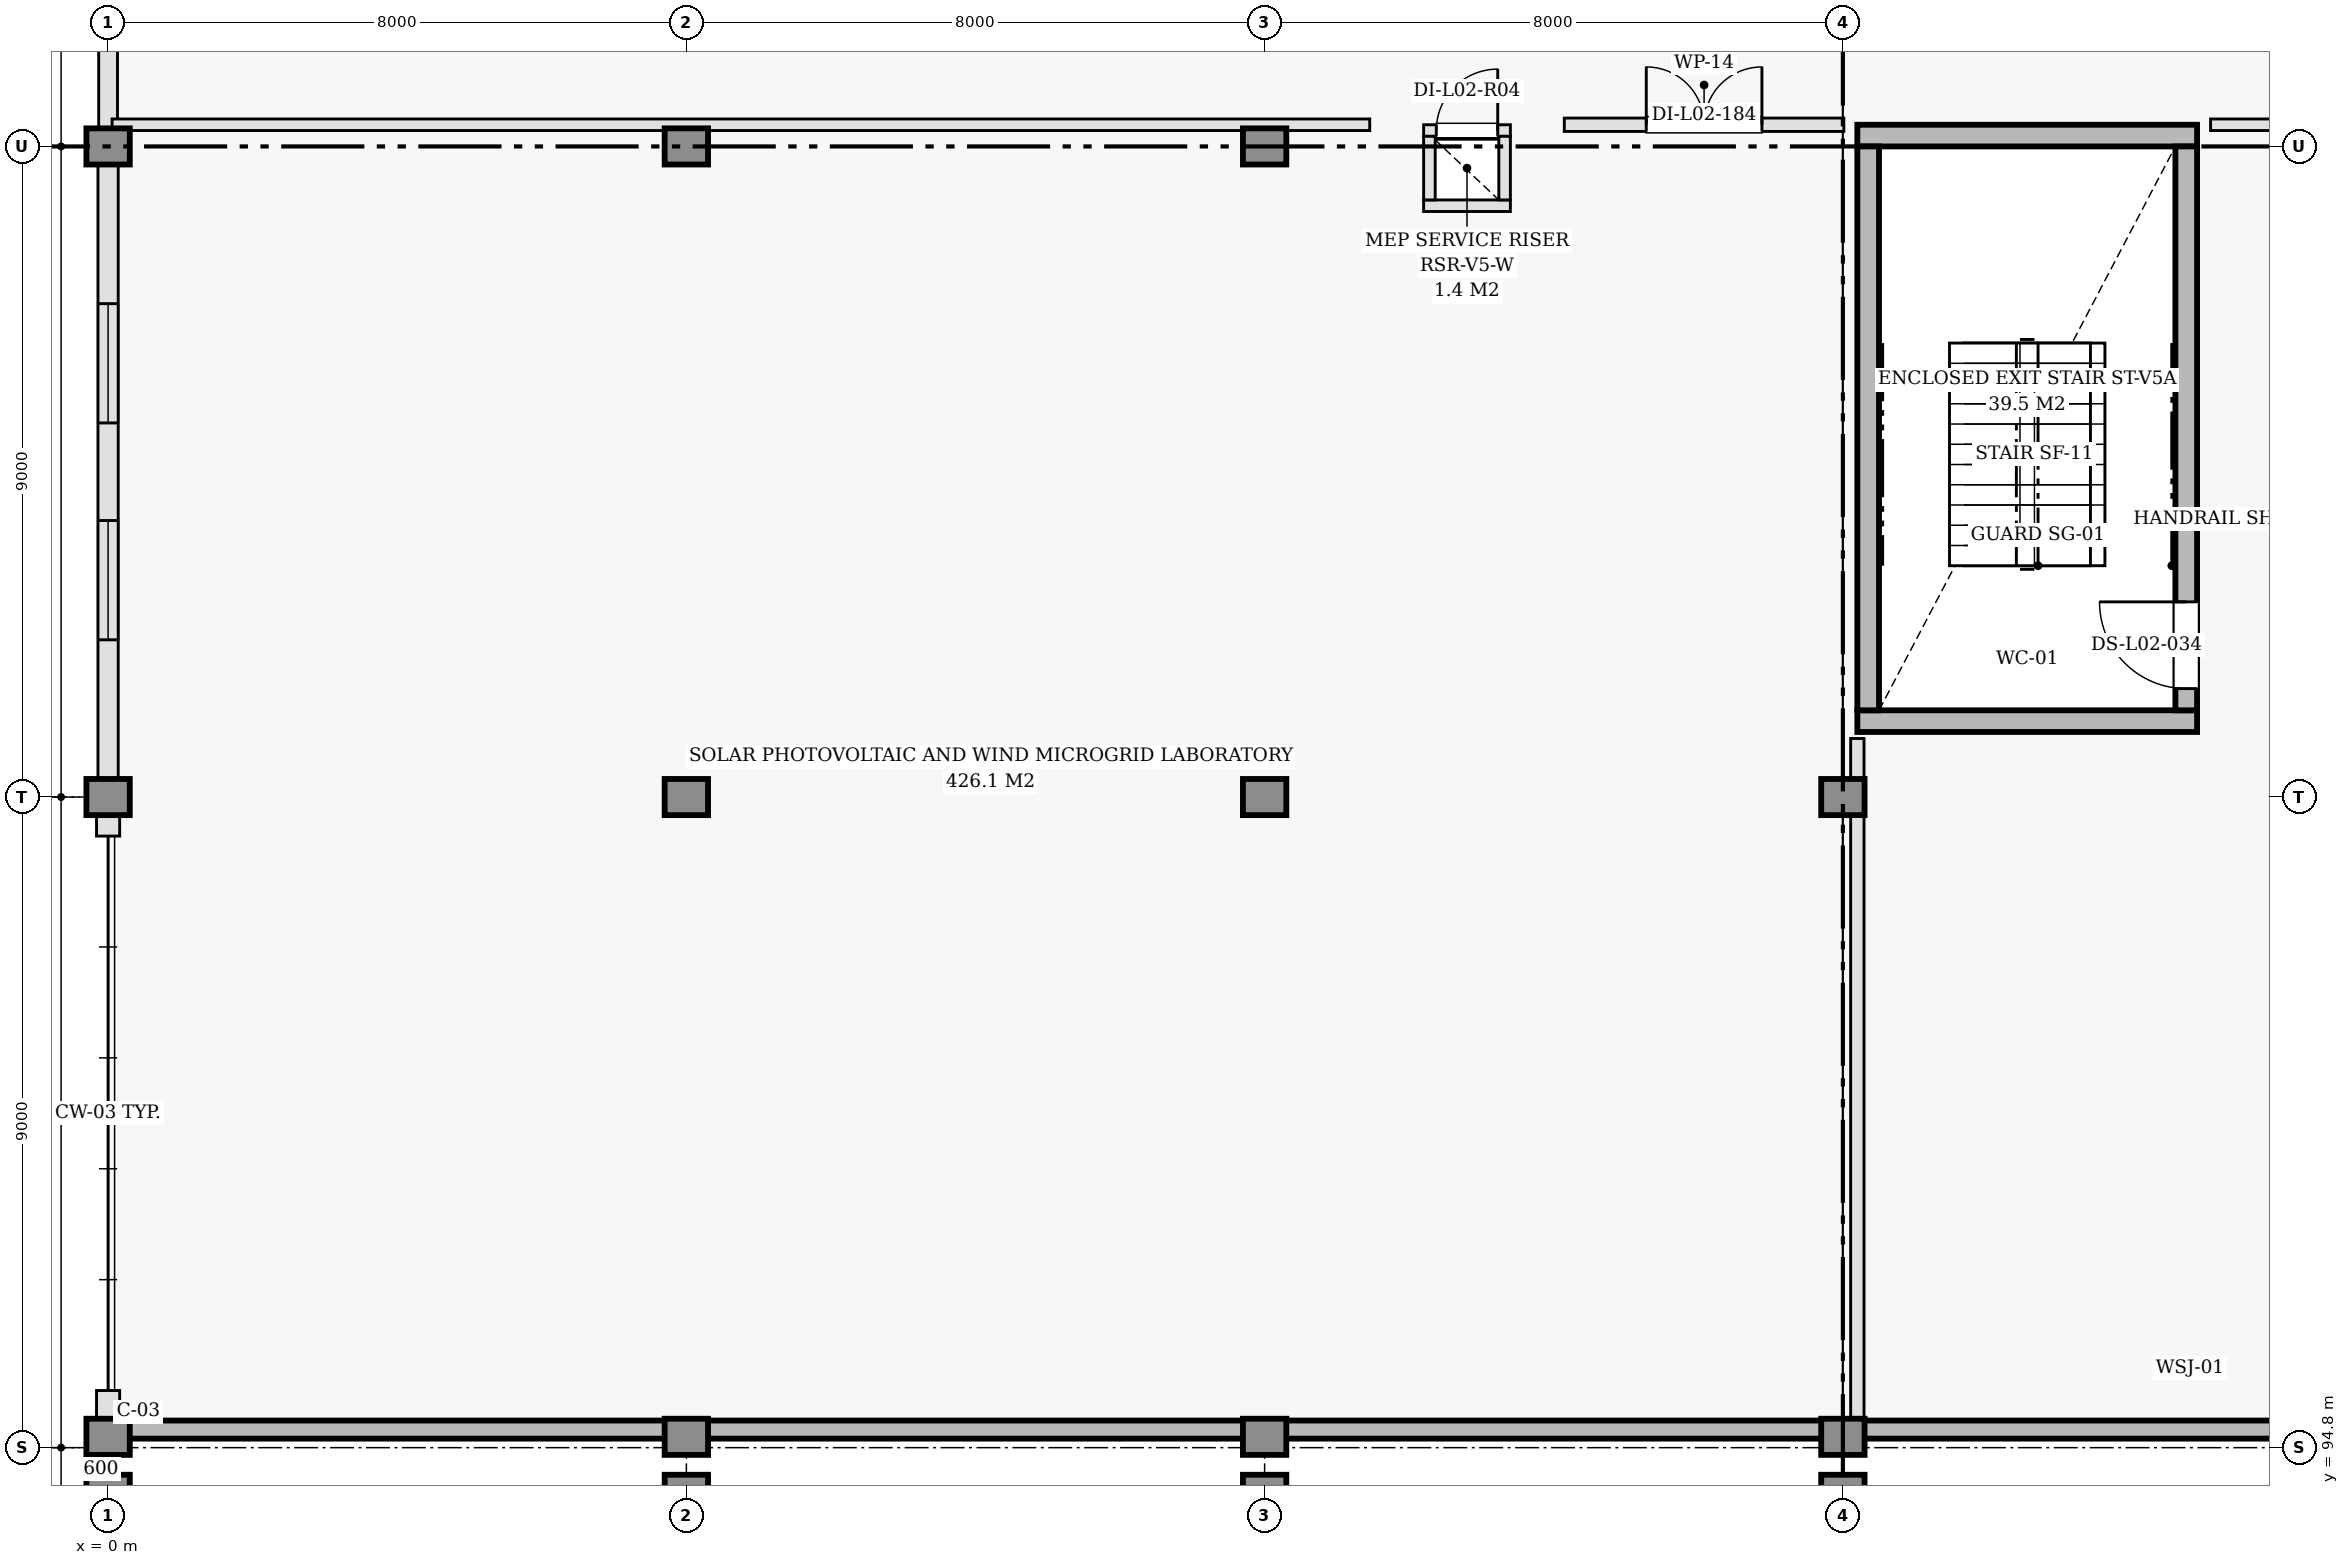
"""IFC4 building model, lengths in metres.
Left out: names, types, materials, properties, quantities, classifications, styles, units other than length and angle.
Written with IfcOpenShell. Run it as: python <this file> out.ifc"""

import sys

from ifc_helpers import new_model, si_unit, direction, frame, frame_2d, origin, origin_2d, place, context, subcontext, project, spatial, rectangle, extrude, element, fill, save


model = new_model("IFC4")
c1 = context("Model", 3, precision=1e-05, world=origin(), true_north=direction((0.0, 1.0)))
c2 = subcontext(c1, "Body", "Model", "MODEL_VIEW")
j1 = project(units=[si_unit("LENGTHUNIT", "METRE"), si_unit("PLANEANGLEUNIT", "RADIAN")], contexts=[c1])
p1 = place(None, origin())
s1 = spatial("IfcSite", under=j1, at=p1, CompositionType="ELEMENT")
p2 = place(p1, origin())
s2 = spatial("IfcBuilding", under=s1, at=p2, CompositionType="ELEMENT")
p3 = place(p2, frame((0.0, 0.0, 9.6)))
s3 = spatial("IfcBuildingStorey", under=s2, at=p3, CompositionType="ELEMENT", Elevation=9.6)
for number, where, z_axis, x_axis in (
    (1, (0.0, 94.95, 0.0), (0.0, 0.0, 1.0), (1.0, 0.0, 0.0)),
    (2, (0.0, 103.8, 0.0), (0.0, 0.0, 1.0), (1.0, 0.0, 0.0)),
    (3, (0.0, 112.8, 0.0), (0.0, 0.0, 1.0), (1.0, 0.0, 0.0)),
    (4, (8.0, 94.95, 0.0), (0.0, 0.0, 1.0), (1.0, 0.0, 0.0)),
    (5, (8.0, 103.8, 0.0), (0.0, 0.0, 1.0), (1.0, 0.0, 0.0)),
    (6, (8.0, 112.8, 0.0), (0.0, 0.0, 1.0), (1.0, 0.0, 0.0)),
    (7, (16.0, 94.95, 0.0), (0.0, 0.0, 1.0), (1.0, 0.0, 0.0)),
    (8, (16.0, 103.8, 0.0), (0.0, 0.0, 1.0), (1.0, 0.0, 0.0)),
    (9, (16.0, 112.8, 0.0), (0.0, 0.0, 1.0), (1.0, 0.0, 0.0)),
    (10, (24.0, 94.95, 0.0), (0.0, 0.0, 1.0), (1.0, 0.0, 0.0)),
    (11, (24.0, 103.8, 0.0), (0.0, 0.0, 1.0), (1.0, 0.0, 0.0)),
):
    element("IfcColumn", number, at=place(p3, frame(where, z_axis=z_axis, x_axis=x_axis)), inside=s3, PredefinedType="COLUMN", context=c2, shape_type="SweptSolid", body=[
        extrude(rectangle(XDim=0.5, YDim=0.5, at=origin_2d()), origin(), (0.0, 0.0, 1.0), 4.2),
    ])
for number, where, z_axis, x_axis in (
    (12, (0.0, 94.2, 0.0), (0.0, 0.0, 1.0), (1.0, 0.0, 0.0)),
    (13, (8.0, 94.2, 0.0), (0.0, 0.0, 1.0), (1.0, 0.0, 0.0)),
    (14, (16.0, 94.2, 0.0), (0.0, 0.0, 1.0), (1.0, 0.0, 0.0)),
    (15, (24.0, 94.2, 0.0), (0.0, 0.0, 1.0), (1.0, 0.0, 0.0)),
):
    element("IfcColumn", number, at=place(p3, frame(where, z_axis=z_axis, x_axis=x_axis)), inside=s3, PredefinedType="COLUMN", context=c2, shape_type="SweptSolid", body=[
        extrude(rectangle(XDim=0.45, YDim=0.45, at=origin_2d()), origin(), (0.0, 0.0, 1.0), 4.2),
    ])
p4 = place(p3, frame((0.0, 95.05, 0.0), z_axis=(0.0, 0.0, 1.0), x_axis=(1.0, 0.0, 0.0)))
e16 = element("IfcWall", 16, at=p4, inside=s3, PredefinedType="SHEAR", context=c2, shape_type="SweptSolid", body=[
    extrude(rectangle(XDim=57.6, YDim=0.25, at=frame_2d((28.8, 0.0))), origin(), (0.0, 0.0, 1.0), 3.94),
])
p5 = place(p3, frame((0.0, 121.8, 0.0), z_axis=(0.0, 0.0, 1.0), x_axis=(0.0, -1.0, 0.0)))
e17 = element("IfcWall", 17, at=p5, inside=s3, PredefinedType="SOLIDWALL", context=c2, shape_type="SweptSolid", body=[
    extrude(rectangle(XDim=9.0, YDim=0.26, at=frame_2d((4.5, 0.0))), origin(), (0.0, 0.0, 1.0), 3.175),
])
p6 = place(p5, frame((2.1, 0.0, 0.95)))
e18 = element("IfcOpeningElement", 18, at=p6, cuts=e17, PredefinedType="OPENING", context=c2, shape_type="SweptSolid", body=[
    extrude(rectangle(XDim=1.8, YDim=1.75, at=frame_2d((0.9, 0.875))), frame((0.0, 0.14, 0.0), z_axis=(0.0, -1.0, 0.0), x_axis=(1.0, 0.0, 0.0)), (0.0, 0.0, 1.0), 0.28),
])
p7 = place(p3, frame((0.0, 112.8, 0.0), z_axis=(0.0, 0.0, 1.0), x_axis=(0.0, -1.0, 0.0)))
e19 = element("IfcWall", 19, at=p7, inside=s3, PredefinedType="SOLIDWALL", context=c2, shape_type="SweptSolid", body=[
    extrude(rectangle(XDim=9.0, YDim=0.28, at=frame_2d((4.5, 0.0))), origin(), (0.0, 0.0, 1.0), 3.175),
])
p8 = place(p7, frame((2.175, 0.0, 0.95)))
e20 = element("IfcOpeningElement", 20, at=p8, cuts=e19, PredefinedType="OPENING", context=c2, shape_type="SweptSolid", body=[
    extrude(rectangle(XDim=1.65, YDim=1.7, at=frame_2d((0.825, 0.85))), frame((0.0, 0.15, 0.0), z_axis=(0.0, -1.0, 0.0), x_axis=(1.0, 0.0, 0.0)), (0.0, 0.0, 1.0), 0.3),
])
p9 = place(p7, frame((5.175, 0.0, 0.95)))
e21 = element("IfcOpeningElement", 21, at=p9, cuts=e19, PredefinedType="OPENING", context=c2, shape_type="SweptSolid", body=[
    extrude(rectangle(XDim=1.65, YDim=1.7, at=frame_2d((0.825, 0.85))), frame((0.0, 0.15, 0.0), z_axis=(0.0, -1.0, 0.0), x_axis=(1.0, 0.0, 0.0)), (0.0, 0.0, 1.0), 0.3),
])
p10 = place(p3, frame((0.0, 103.8, 0.0), z_axis=(0.0, 0.0, 1.0), x_axis=(0.0, -1.0, 0.0)))
e22 = element("IfcWall", 22, at=p10, inside=s3, PredefinedType="SOLIDWALL", context=c2, shape_type="SweptSolid", body=[
    extrude(rectangle(XDim=0.54, YDim=0.32, at=frame_2d((0.27, 0.0))), origin(), (0.0, 0.0, 1.0), 3.175),
])
p11 = place(p3, frame((0.0, 95.59, 0.0), z_axis=(0.0, 0.0, 1.0), x_axis=(0.0, -1.0, 0.0)))
e23 = element("IfcWall", 23, at=p11, inside=s3, PredefinedType="SOLIDWALL", context=c2, shape_type="SweptSolid", body=[
    extrude(rectangle(XDim=0.413, YDim=0.32, at=frame_2d((0.207, 0.0))), origin(), (0.0, 0.0, 1.0), 3.175),
])
for number, where, z_axis, x_axis in (
    (24, (24.2, 104.85, 0.0), (0.0, 0.0, 1.0), (1.0, 0.0, 0.0)),
    (25, (24.2, 112.95, 0.0), (0.0, 0.0, 1.0), (1.0, 0.0, 0.0)),
):
    element("IfcWall", number, at=place(p3, frame(where, z_axis=z_axis, x_axis=x_axis)), inside=s3, PredefinedType="SHEAR", context=c2, shape_type="SweptSolid", body=[
        extrude(rectangle(XDim=4.7, YDim=0.3, at=frame_2d((2.35, 0.0))), origin(), (0.0, 0.0, 1.0), 3.94),
    ])
p12 = place(p3, frame((24.35, 105.0, 0.0), z_axis=(0.0, 0.0, 1.0), x_axis=(0.0, 1.0, 0.0)))
e26 = element("IfcWall", 26, at=p12, inside=s3, PredefinedType="SHEAR", context=c2, shape_type="SweptSolid", body=[
    extrude(rectangle(XDim=7.8, YDim=0.3, at=frame_2d((3.9, 0.0))), origin(), (0.0, 0.0, 1.0), 3.94),
])
p13 = place(p3, frame((28.75, 105.0, 0.0), z_axis=(0.0, 0.0, 1.0), x_axis=(0.0, 1.0, 0.0)))
e27 = element("IfcWall", 27, at=p13, inside=s3, PredefinedType="SHEAR", context=c2, shape_type="SweptSolid", body=[
    extrude(rectangle(XDim=7.8, YDim=0.3, at=frame_2d((3.9, 0.0))), origin(), (0.0, 0.0, 1.0), 3.94),
])
p14 = place(p13, frame((0.3, 0.0, 0.0)))
e28 = element("IfcOpeningElement", 28, at=p14, cuts=e27, PredefinedType="OPENING", context=c2, shape_type="SweptSolid", body=[
    extrude(rectangle(XDim=1.2, YDim=2.15, at=frame_2d((0.6, 1.075))), frame((0.0, 0.16, 0.0), z_axis=(0.0, -1.0, 0.0), x_axis=(1.0, 0.0, 0.0)), (0.0, 0.0, 1.0), 0.32),
])
p15 = place(p3, frame((18.2, 111.98, 0.0), z_axis=(0.0, 0.0, 1.0), x_axis=(1.0, 0.0, 0.0)))
e29 = element("IfcWall", 29, at=p15, inside=s3, PredefinedType="PARTITIONING", context=c2, shape_type="SweptSolid", body=[
    extrude(rectangle(XDim=1.2, YDim=0.16, at=frame_2d((0.6, 0.0))), origin(), (0.0, 0.0, 1.0), 3.94),
])
p16 = place(p3, frame((18.2, 113.02, 0.0), z_axis=(0.0, 0.0, 1.0), x_axis=(1.0, 0.0, 0.0)))
e30 = element("IfcWall", 30, at=p16, inside=s3, PredefinedType="PARTITIONING", context=c2, shape_type="SweptSolid", body=[
    extrude(rectangle(XDim=1.2, YDim=0.16, at=frame_2d((0.6, 0.0))), origin(), (0.0, 0.0, 1.0), 3.94),
])
p17 = place(p16, frame((0.175, 0.0, 0.0)))
e31 = element("IfcOpeningElement", 31, at=p17, cuts=e30, PredefinedType="OPENING", context=c2, shape_type="SweptSolid", body=[
    extrude(rectangle(XDim=0.85, YDim=2.02, at=frame_2d((0.425, 1.01))), frame((0.0, 0.09, 0.0), z_axis=(0.0, -1.0, 0.0), x_axis=(1.0, 0.0, 0.0)), (0.0, 0.0, 1.0), 0.18),
])
for number, where, z_axis, x_axis in (
    (32, (18.28, 112.06, 0.0), (0.0, 0.0, 1.0), (0.0, 1.0, 0.0)),
    (33, (19.32, 112.06, 0.0), (0.0, 0.0, 1.0), (0.0, 1.0, 0.0)),
):
    element("IfcWall", number, at=place(p3, frame(where, z_axis=z_axis, x_axis=x_axis)), inside=s3, PredefinedType="PARTITIONING", context=c2, shape_type="SweptSolid", body=[
        extrude(rectangle(XDim=0.88, YDim=0.16, at=frame_2d((0.44, 0.0))), origin(), (0.0, 0.0, 1.0), 3.94),
    ])
p18 = place(p3, frame((20.146, 113.1, 0.0), z_axis=(0.0, 0.0, 1.0), x_axis=(1.0, 0.0, 0.0)))
e34 = element("IfcWall", 34, at=p18, inside=s3, PredefinedType="PARTITIONING", context=c2, shape_type="SweptSolid", body=[
    extrude(rectangle(XDim=3.867, YDim=0.185, at=frame_2d((1.934, 0.0))), origin(), (0.0, 0.0, 1.0), 3.94),
])
p19 = place(p18, frame((1.134, 0.0, 0.0)))
e35 = element("IfcOpeningElement", 35, at=p19, cuts=e34, PredefinedType="OPENING", context=c2, shape_type="SweptSolid", body=[
    extrude(rectangle(XDim=1.6, YDim=2.2, at=frame_2d((0.8, 1.1))), frame((0.0, 0.103, 0.0), z_axis=(0.0, -1.0, 0.0), x_axis=(1.0, 0.0, 0.0)), (0.0, 0.0, 1.0), 0.205),
])
p20 = place(p3, frame((0.055, 113.1, 0.0), z_axis=(0.0, 0.0, 1.0), x_axis=(1.0, 0.0, 0.0)))
e36 = element("IfcWall", 36, at=p20, inside=s3, PredefinedType="PARTITIONING", context=c2, shape_type="SweptSolid", body=[
    extrude(rectangle(XDim=17.399, YDim=0.16, at=frame_2d((8.7, 0.0))), origin(), (0.0, 0.0, 1.0), 3.175),
])
p21 = place(p3, frame((24.2, 95.105, 0.0), z_axis=(0.0, 0.0, 1.0), x_axis=(0.0, 1.0, 0.0)))
e37 = element("IfcWall", 37, at=p21, inside=s3, PredefinedType="PARTITIONING", context=c2, shape_type="SweptSolid", body=[
    extrude(rectangle(XDim=9.505, YDim=0.185, at=frame_2d((4.752, 0.0))), origin(), (0.0, 0.0, 1.0), 3.175),
])
p22 = place(p3, frame((29.087, 113.1, 0.0), z_axis=(0.0, 0.0, 1.0), x_axis=(1.0, 0.0, 0.0)))
e38 = element("IfcWall", 38, at=p22, inside=s3, PredefinedType="PARTITIONING", context=c2, shape_type="SweptSolid", body=[
    extrude(rectangle(XDim=2.873, YDim=0.16, at=frame_2d((1.437, 0.0))), origin(), (0.0, 0.0, 1.0), 3.275),
])
p23 = place(p8, origin())
e39 = element("IfcWindow", 39, at=p23, inside=s3, PartitioningType="DOUBLE_PANEL_VERTICAL", PredefinedType="WINDOW", context=c2, shape_type="SweptSolid", body=[
    extrude(rectangle(XDim=1.65, YDim=1.7, at=frame_2d((0.825, 0.85))), frame((0.0, 0.03, 0.0), z_axis=(0.0, -1.0, 0.0), x_axis=(1.0, 0.0, 0.0)), (0.0, 0.0, 1.0), 0.06),
])
fill(e20, e39)
p24 = place(p9, origin())
e40 = element("IfcWindow", 40, at=p24, inside=s3, PartitioningType="DOUBLE_PANEL_VERTICAL", PredefinedType="WINDOW", context=c2, shape_type="SweptSolid", body=[
    extrude(rectangle(XDim=1.65, YDim=1.7, at=frame_2d((0.825, 0.85))), frame((0.0, 0.03, 0.0), z_axis=(0.0, -1.0, 0.0), x_axis=(1.0, 0.0, 0.0)), (0.0, 0.0, 1.0), 0.06),
])
fill(e21, e40)
p25 = place(p14, origin())
e41 = element("IfcDoor", 41, at=p25, inside=s3, OperationType="SINGLE_SWING_RIGHT", PredefinedType="DOOR", context=c2, shape_type="SweptSolid", body=[
    extrude(rectangle(XDim=1.2, YDim=2.15, at=frame_2d((0.6, 1.075))), frame((0.0, 0.025, 0.0), z_axis=(0.0, -1.0, 0.0), x_axis=(1.0, 0.0, 0.0)), (0.0, 0.0, 1.0), 0.05),
])
fill(e28, e41)
p26 = place(p17, origin())
e42 = element("IfcDoor", 42, at=p26, inside=s3, OperationType="SINGLE_SWING_RIGHT", PredefinedType="DOOR", context=c2, shape_type="SweptSolid", body=[
    extrude(rectangle(XDim=0.85, YDim=2.02, at=frame_2d((0.425, 1.01))), frame((0.0, 0.025, 0.0), z_axis=(0.0, -1.0, 0.0), x_axis=(1.0, 0.0, 0.0)), (0.0, 0.0, 1.0), 0.05),
])
fill(e31, e42)
p27 = place(p19, origin())
e43 = element("IfcDoor", 43, at=p27, inside=s3, OperationType="DOUBLE_DOOR_SINGLE_SWING", PredefinedType="DOOR", context=c2, shape_type="SweptSolid", body=[
    extrude(rectangle(XDim=1.6, YDim=2.2, at=frame_2d((0.8, 1.1))), frame((0.0, 0.025, 0.0), z_axis=(0.0, -1.0, 0.0), x_axis=(1.0, 0.0, 0.0)), (0.0, 0.0, 1.0), 0.05),
])
fill(e35, e43)
save(model, sys.argv[1])
